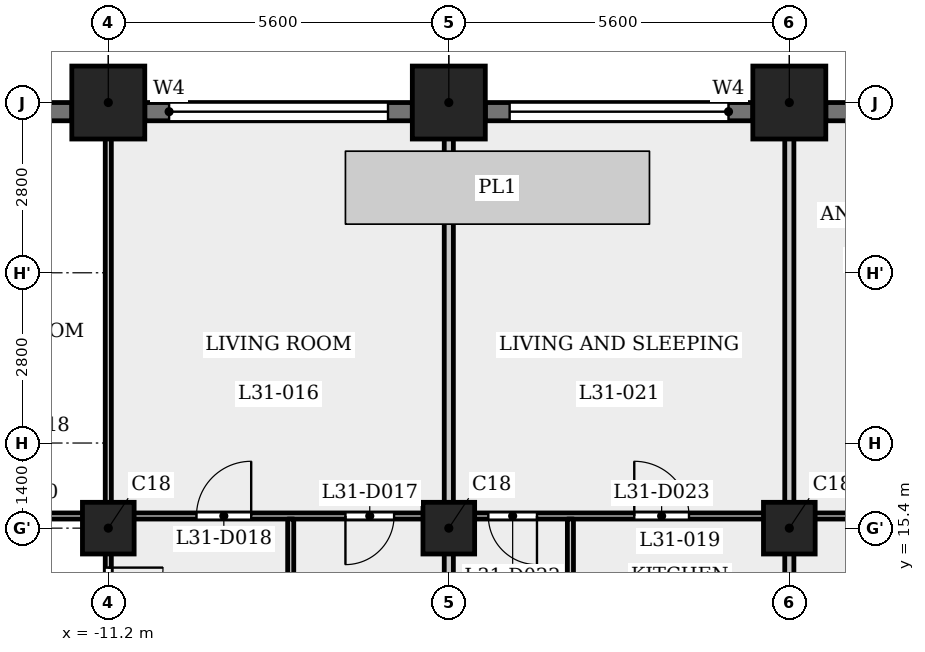
"""IFC4 building model, lengths in metres.
Left out: names, types, materials, properties, quantities, classifications, styles, units other than length and angle.
Written with IfcOpenShell. Run it as: python <this file> out.ifc"""

import sys

from ifc_helpers import new_model, si_unit, direction, frame, frame_2d, origin, origin_2d, place, context, subcontext, project, spatial, rectangle, extrude, element, fill, save


model = new_model("IFC4")
c1 = context("Model", 3, precision=1e-05, world=origin(), true_north=direction((0.0, 1.0)))
c2 = subcontext(c1, "Body", "Model", "MODEL_VIEW")
j1 = project(units=[si_unit("LENGTHUNIT", "METRE"), si_unit("PLANEANGLEUNIT", "RADIAN")], contexts=[c1])
p1 = place(None, origin())
s1 = spatial("IfcSite", under=j1, at=p1, CompositionType="ELEMENT")
p2 = place(p1, origin())
s2 = spatial("IfcBuilding", under=s1, at=p2, CompositionType="ELEMENT")
p3 = place(p2, frame((0.0, 0.0, 121.8)))
s3 = spatial("IfcBuildingStorey", under=s2, at=p3, CompositionType="ELEMENT", Elevation=121.8)
for number, where, z_axis, x_axis in (
    (1, (0.0, 22.4, 0.0), (0.0, 0.0, 1.0), (1.0, 0.0, 0.0)),
    (2, (-5.6, 22.4, 0.0), (0.0, 0.0, 1.0), (1.0, 0.0, 0.0)),
    (3, (-11.2, 22.4, 0.0), (0.0, 0.0, 1.0), (1.0, 0.0, 0.0)),
):
    element("IfcColumn", number, at=place(p3, frame(where, z_axis=z_axis, x_axis=x_axis)), inside=s3, PredefinedType="COLUMN", context=c2, shape_type="SweptSolid", body=[
        extrude(rectangle(XDim=1.2, YDim=1.2, at=origin_2d()), origin(), (0.0, 0.0, 1.0), 3.5),
    ])
for number, where, z_axis, x_axis in (
    (4, (-11.2, 15.4, 0.0), (0.0, 0.0, 1.0), (1.0, 0.0, 0.0)),
    (5, (-5.6, 15.4, 0.0), (0.0, 0.0, 1.0), (1.0, 0.0, 0.0)),
    (6, (0.0, 15.4, 0.0), (0.0, 0.0, 1.0), (1.0, 0.0, 0.0)),
):
    element("IfcColumn", number, at=place(p3, frame(where, z_axis=z_axis, x_axis=x_axis)), inside=s3, PredefinedType="COLUMN", context=c2, shape_type="SweptSolid", body=[
        extrude(rectangle(XDim=0.85, YDim=0.85, at=origin_2d()), origin(), (0.0, 0.0, 1.0), 3.5),
    ])
p4 = place(p3, frame((5.0, 22.25, 0.0), z_axis=(0.0, 0.0, 1.0), x_axis=(-1.0, 0.0, 0.0)))
e7 = element("IfcWall", 7, at=p4, inside=s3, PredefinedType="SOLIDWALL", context=c2, shape_type="SweptSolid", body=[
    extrude(rectangle(XDim=4.4, YDim=0.3, at=frame_2d((2.2, 0.0))), origin(), (0.0, 0.0, 1.0), 2.35),
])
p5 = place(p4, frame((0.262, 0.0, 0.6)))
e8 = element("IfcOpeningElement", 8, at=p5, cuts=e7, PredefinedType="OPENING", context=c2, shape_type="SweptSolid", body=[
    extrude(rectangle(XDim=1.2, YDim=1.55, at=frame_2d((0.6, 0.775))), frame((0.0, 0.16, 0.0), z_axis=(0.0, -1.0, 0.0), x_axis=(1.0, 0.0, 0.0)), (0.0, 0.0, 1.0), 0.32),
])
p6 = place(p4, frame((2.238, 0.0, 0.9)))
e9 = element("IfcOpeningElement", 9, at=p6, cuts=e7, PredefinedType="OPENING", context=c2, shape_type="SweptSolid", body=[
    extrude(rectangle(XDim=1.8, YDim=1.25, at=frame_2d((0.9, 0.625))), frame((0.0, 0.16, 0.0), z_axis=(0.0, -1.0, 0.0), x_axis=(1.0, 0.0, 0.0)), (0.0, 0.0, 1.0), 0.32),
])
p7 = place(p3, frame((-0.6, 22.25, 0.0), z_axis=(0.0, 0.0, 1.0), x_axis=(-1.0, 0.0, 0.0)))
e10 = element("IfcWall", 10, at=p7, inside=s3, PredefinedType="SOLIDWALL", context=c2, shape_type="SweptSolid", body=[
    extrude(rectangle(XDim=4.4, YDim=0.3, at=frame_2d((2.2, 0.0))), origin(), (0.0, 0.0, 1.0), 2.35),
])
p8 = place(p7, frame((0.4, 0.0, 1.2)))
e11 = element("IfcOpeningElement", 11, at=p8, cuts=e10, PredefinedType="OPENING", context=c2, shape_type="SweptSolid", body=[
    extrude(rectangle(XDim=3.6, YDim=0.95, at=frame_2d((1.8, 0.475))), frame((0.0, 0.16, 0.0), z_axis=(0.0, -1.0, 0.0), x_axis=(1.0, 0.0, 0.0)), (0.0, 0.0, 1.0), 0.32),
])
p9 = place(p3, frame((-6.2, 22.25, 0.0), z_axis=(0.0, 0.0, 1.0), x_axis=(-1.0, 0.0, 0.0)))
e12 = element("IfcWall", 12, at=p9, inside=s3, PredefinedType="SOLIDWALL", context=c2, shape_type="SweptSolid", body=[
    extrude(rectangle(XDim=4.4, YDim=0.3, at=frame_2d((2.2, 0.0))), origin(), (0.0, 0.0, 1.0), 2.35),
])
p10 = place(p9, frame((0.4, 0.0, 1.2)))
e13 = element("IfcOpeningElement", 13, at=p10, cuts=e12, PredefinedType="OPENING", context=c2, shape_type="SweptSolid", body=[
    extrude(rectangle(XDim=3.6, YDim=0.95, at=frame_2d((1.8, 0.475))), frame((0.0, 0.16, 0.0), z_axis=(0.0, -1.0, 0.0), x_axis=(1.0, 0.0, 0.0)), (0.0, 0.0, 1.0), 0.32),
])
p11 = place(p3, frame((-11.8, 22.25, 0.0), z_axis=(0.0, 0.0, 1.0), x_axis=(-1.0, 0.0, 0.0)))
e14 = element("IfcWall", 14, at=p11, inside=s3, PredefinedType="SOLIDWALL", context=c2, shape_type="SweptSolid", body=[
    extrude(rectangle(XDim=4.4, YDim=0.3, at=frame_2d((2.2, 0.0))), origin(), (0.0, 0.0, 1.0), 2.35),
])
p12 = place(p11, frame((0.363, 0.0, 0.6)))
e15 = element("IfcOpeningElement", 15, at=p12, cuts=e14, PredefinedType="OPENING", context=c2, shape_type="SweptSolid", body=[
    extrude(rectangle(XDim=1.2, YDim=1.55, at=frame_2d((0.6, 0.775))), frame((0.0, 0.16, 0.0), z_axis=(0.0, -1.0, 0.0), x_axis=(1.0, 0.0, 0.0)), (0.0, 0.0, 1.0), 0.32),
])
p13 = place(p11, frame((2.337, 0.0, 0.9)))
e16 = element("IfcOpeningElement", 16, at=p13, cuts=e14, PredefinedType="OPENING", context=c2, shape_type="SweptSolid", body=[
    extrude(rectangle(XDim=1.8, YDim=1.25, at=frame_2d((0.9, 0.625))), frame((0.0, 0.16, 0.0), z_axis=(0.0, -1.0, 0.0), x_axis=(1.0, 0.0, 0.0)), (0.0, 0.0, 1.0), 0.32),
])
p14 = place(p3, frame((-16.725, 15.6, 0.0), z_axis=(0.0, 0.0, 1.0), x_axis=(1.0, 0.0, 0.0)))
e17 = element("IfcWall", 17, at=p14, inside=s3, PredefinedType="PARTITIONING", context=c2, shape_type="SweptSolid", body=[
    extrude(rectangle(XDim=33.45, YDim=0.1, at=frame_2d((16.725, 0.0))), origin(), (0.0, 0.0, 1.0), 3.15),
])
p15 = place(p14, frame((9.425, 0.0, 0.0)))
e18 = element("IfcOpeningElement", 18, at=p15, cuts=e17, PredefinedType="OPENING", context=c2, shape_type="SweptSolid", body=[
    extrude(rectangle(XDim=0.8, YDim=2.1, at=frame_2d((0.4, 1.05))), frame((0.0, 0.06, 0.0), z_axis=(0.0, -1.0, 0.0), x_axis=(1.0, 0.0, 0.0)), (0.0, 0.0, 1.0), 0.12),
])
p16 = place(p14, frame((6.975, 0.0, 0.0)))
e19 = element("IfcOpeningElement", 19, at=p16, cuts=e17, PredefinedType="OPENING", context=c2, shape_type="SweptSolid", body=[
    extrude(rectangle(XDim=0.9, YDim=2.1, at=frame_2d((0.45, 1.05))), frame((0.0, 0.06, 0.0), z_axis=(0.0, -1.0, 0.0), x_axis=(1.0, 0.0, 0.0)), (0.0, 0.0, 1.0), 0.12),
])
p17 = place(p14, frame((1.875, 0.0, 0.0)))
e20 = element("IfcOpeningElement", 20, at=p17, cuts=e17, PredefinedType="OPENING", context=c2, shape_type="SweptSolid", body=[
    extrude(rectangle(XDim=0.9, YDim=2.1, at=frame_2d((0.45, 1.05))), frame((0.0, 0.06, 0.0), z_axis=(0.0, -1.0, 0.0), x_axis=(1.0, 0.0, 0.0)), (0.0, 0.0, 1.0), 0.12),
])
p18 = place(p14, frame((3.475, 0.0, 0.0)))
e21 = element("IfcOpeningElement", 21, at=p18, cuts=e17, PredefinedType="OPENING", context=c2, shape_type="SweptSolid", body=[
    extrude(rectangle(XDim=0.9, YDim=2.1, at=frame_2d((0.45, 1.05))), frame((0.0, 0.06, 0.0), z_axis=(0.0, -1.0, 0.0), x_axis=(1.0, 0.0, 0.0)), (0.0, 0.0, 1.0), 0.12),
])
p19 = place(p14, frame((11.775, 0.0, 0.0)))
e22 = element("IfcOpeningElement", 22, at=p19, cuts=e17, PredefinedType="OPENING", context=c2, shape_type="SweptSolid", body=[
    extrude(rectangle(XDim=0.8, YDim=2.1, at=frame_2d((0.4, 1.05))), frame((0.0, 0.06, 0.0), z_axis=(0.0, -1.0, 0.0), x_axis=(1.0, 0.0, 0.0)), (0.0, 0.0, 1.0), 0.12),
])
p20 = place(p14, frame((14.175, 0.0, 0.0)))
e23 = element("IfcOpeningElement", 23, at=p20, cuts=e17, PredefinedType="OPENING", context=c2, shape_type="SweptSolid", body=[
    extrude(rectangle(XDim=0.9, YDim=2.1, at=frame_2d((0.45, 1.05))), frame((0.0, 0.06, 0.0), z_axis=(0.0, -1.0, 0.0), x_axis=(1.0, 0.0, 0.0)), (0.0, 0.0, 1.0), 0.12),
])
p21 = place(p14, frame((20.725, 0.0, 0.0)))
e24 = element("IfcOpeningElement", 24, at=p21, cuts=e17, PredefinedType="OPENING", context=c2, shape_type="SweptSolid", body=[
    extrude(rectangle(XDim=0.8, YDim=2.1, at=frame_2d((0.4, 1.05))), frame((0.0, 0.06, 0.0), z_axis=(0.0, -1.0, 0.0), x_axis=(1.0, 0.0, 0.0)), (0.0, 0.0, 1.0), 0.12),
])
p22 = place(p14, frame((18.375, 0.0, 0.0)))
e25 = element("IfcOpeningElement", 25, at=p22, cuts=e17, PredefinedType="OPENING", context=c2, shape_type="SweptSolid", body=[
    extrude(rectangle(XDim=0.9, YDim=2.1, at=frame_2d((0.45, 1.05))), frame((0.0, 0.06, 0.0), z_axis=(0.0, -1.0, 0.0), x_axis=(1.0, 0.0, 0.0)), (0.0, 0.0, 1.0), 0.12),
])
p23 = place(p14, frame((26.425, 0.0, 0.0)))
e26 = element("IfcOpeningElement", 26, at=p23, cuts=e17, PredefinedType="OPENING", context=c2, shape_type="SweptSolid", body=[
    extrude(rectangle(XDim=0.8, YDim=2.1, at=frame_2d((0.4, 1.05))), frame((0.0, 0.06, 0.0), z_axis=(0.0, -1.0, 0.0), x_axis=(1.0, 0.0, 0.0)), (0.0, 0.0, 1.0), 0.12),
])
p24 = place(p14, frame((23.875, 0.0, 0.0)))
e27 = element("IfcOpeningElement", 27, at=p24, cuts=e17, PredefinedType="OPENING", context=c2, shape_type="SweptSolid", body=[
    extrude(rectangle(XDim=0.9, YDim=2.1, at=frame_2d((0.45, 1.05))), frame((0.0, 0.06, 0.0), z_axis=(0.0, -1.0, 0.0), x_axis=(1.0, 0.0, 0.0)), (0.0, 0.0, 1.0), 0.12),
])
p25 = place(p14, frame((28.575, 0.0, 0.0)))
e28 = element("IfcOpeningElement", 28, at=p25, cuts=e17, PredefinedType="OPENING", context=c2, shape_type="SweptSolid", body=[
    extrude(rectangle(XDim=0.8, YDim=2.1, at=frame_2d((0.4, 1.05))), frame((0.0, 0.06, 0.0), z_axis=(0.0, -1.0, 0.0), x_axis=(1.0, 0.0, 0.0)), (0.0, 0.0, 1.0), 0.12),
])
p26 = place(p14, frame((30.725, 0.0, 0.0)))
e29 = element("IfcOpeningElement", 29, at=p26, cuts=e17, PredefinedType="OPENING", context=c2, shape_type="SweptSolid", body=[
    extrude(rectangle(XDim=0.9, YDim=2.1, at=frame_2d((0.45, 1.05))), frame((0.0, 0.06, 0.0), z_axis=(0.0, -1.0, 0.0), x_axis=(1.0, 0.0, 0.0)), (0.0, 0.0, 1.0), 0.12),
])
p27 = place(p3, frame((-11.2, 13.275, 0.0), z_axis=(0.0, 0.0, 1.0), x_axis=(0.0, 1.0, 0.0)))
e30 = element("IfcWall", 30, at=p27, inside=s3, PredefinedType="PARTITIONING", context=c2, shape_type="SweptSolid", body=[
    extrude(rectangle(XDim=2.275, YDim=0.1, at=frame_2d((1.138, 0.0))), origin(), (0.0, 0.0, 1.0), 3.15),
])
p28 = place(p27, frame((0.576, 0.0, 0.0)))
e31 = element("IfcOpeningElement", 31, at=p28, cuts=e30, PredefinedType="OPENING", context=c2, shape_type="SweptSolid", body=[
    extrude(rectangle(XDim=0.9, YDim=2.1, at=frame_2d((0.45, 1.05))), frame((0.0, 0.06, 0.0), z_axis=(0.0, -1.0, 0.0), x_axis=(1.0, 0.0, 0.0)), (0.0, 0.0, 1.0), 0.12),
])
p29 = place(p3, frame((-11.2, 15.65, 0.0), z_axis=(0.0, 0.0, 1.0), x_axis=(0.0, 1.0, 0.0)))
e32 = element("IfcWall", 32, at=p29, inside=s3, PredefinedType="PARTITIONING", context=c2, shape_type="SweptSolid", body=[
    extrude(rectangle(XDim=7.33, YDim=0.1, at=frame_2d((3.665, 0.0))), origin(), (0.0, 0.0, 1.0), 3.15),
])
p30 = place(p3, frame((-8.2, 13.275, 0.0), z_axis=(0.0, 0.0, 1.0), x_axis=(0.0, 1.0, 0.0)))
e33 = element("IfcWall", 33, at=p30, inside=s3, PredefinedType="PARTITIONING", context=c2, shape_type="SweptSolid", body=[
    extrude(rectangle(XDim=2.275, YDim=0.1, at=frame_2d((1.138, 0.0))), origin(), (0.0, 0.0, 1.0), 3.15),
])
p31 = place(p3, frame((-5.6, 13.275, 0.0), z_axis=(0.0, 0.0, 1.0), x_axis=(0.0, 1.0, 0.0)))
e34 = element("IfcWall", 34, at=p31, inside=s3, PredefinedType="PARTITIONING", context=c2, shape_type="SweptSolid", body=[
    extrude(rectangle(XDim=2.275, YDim=0.15, at=frame_2d((1.138, 0.0))), origin(), (0.0, 0.0, 1.0), 3.15),
])
p32 = place(p3, frame((-5.6, 15.65, 0.0), z_axis=(0.0, 0.0, 1.0), x_axis=(0.0, 1.0, 0.0)))
e35 = element("IfcWall", 35, at=p32, inside=s3, PredefinedType="PARTITIONING", context=c2, shape_type="SweptSolid", body=[
    extrude(rectangle(XDim=7.33, YDim=0.15, at=frame_2d((3.665, 0.0))), origin(), (0.0, 0.0, 1.0), 3.15),
])
p33 = place(p3, frame((-3.6, 13.275, 0.0), z_axis=(0.0, 0.0, 1.0), x_axis=(0.0, 1.0, 0.0)))
e36 = element("IfcWall", 36, at=p33, inside=s3, PredefinedType="PARTITIONING", context=c2, shape_type="SweptSolid", body=[
    extrude(rectangle(XDim=2.275, YDim=0.1, at=frame_2d((1.138, 0.0))), origin(), (0.0, 0.0, 1.0), 3.15),
])
p34 = place(p3, frame((0.0, 13.275, 0.0), z_axis=(0.0, 0.0, 1.0), x_axis=(0.0, 1.0, 0.0)))
e37 = element("IfcWall", 37, at=p34, inside=s3, PredefinedType="PARTITIONING", context=c2, shape_type="SweptSolid", body=[
    extrude(rectangle(XDim=2.275, YDim=0.15, at=frame_2d((1.138, 0.0))), origin(), (0.0, 0.0, 1.0), 3.15),
])
p35 = place(p3, frame((0.0, 15.65, 0.0), z_axis=(0.0, 0.0, 1.0), x_axis=(0.0, 1.0, 0.0)))
e38 = element("IfcWall", 38, at=p35, inside=s3, PredefinedType="PARTITIONING", context=c2, shape_type="SweptSolid", body=[
    extrude(rectangle(XDim=7.33, YDim=0.15, at=frame_2d((3.665, 0.0))), origin(), (0.0, 0.0, 1.0), 3.15),
])
p36 = place(p28, origin())
e39 = element("IfcDoor", 39, at=p36, inside=s3, OperationType="SINGLE_SWING_RIGHT", PredefinedType="DOOR", context=c2, shape_type="SweptSolid", body=[
    extrude(rectangle(XDim=0.9, YDim=2.1, at=frame_2d((0.45, 1.05))), frame((0.0, 0.025, 0.0), z_axis=(0.0, -1.0, 0.0), x_axis=(1.0, 0.0, 0.0)), (0.0, 0.0, 1.0), 0.05),
])
fill(e31, e39)
p37 = place(p15, origin())
e40 = element("IfcDoor", 40, at=p37, inside=s3, OperationType="SINGLE_SWING_LEFT", PredefinedType="DOOR", context=c2, shape_type="SweptSolid", body=[
    extrude(rectangle(XDim=0.8, YDim=2.1, at=frame_2d((0.4, 1.05))), frame((0.0, 0.025, 0.0), z_axis=(0.0, -1.0, 0.0), x_axis=(1.0, 0.0, 0.0)), (0.0, 0.0, 1.0), 0.05),
])
fill(e18, e40)
p38 = place(p16, origin())
e41 = element("IfcDoor", 41, at=p38, inside=s3, OperationType="SINGLE_SWING_LEFT", PredefinedType="DOOR", context=c2, shape_type="SweptSolid", body=[
    extrude(rectangle(XDim=0.9, YDim=2.1, at=frame_2d((0.45, 1.05))), frame((0.0, 0.025, 0.0), z_axis=(0.0, -1.0, 0.0), x_axis=(1.0, 0.0, 0.0)), (0.0, 0.0, 1.0), 0.05),
])
fill(e19, e41)
p39 = place(p19, origin())
e42 = element("IfcDoor", 42, at=p39, inside=s3, OperationType="SINGLE_SWING_RIGHT", PredefinedType="DOOR", context=c2, shape_type="SweptSolid", body=[
    extrude(rectangle(XDim=0.8, YDim=2.1, at=frame_2d((0.4, 1.05))), frame((0.0, 0.025, 0.0), z_axis=(0.0, -1.0, 0.0), x_axis=(1.0, 0.0, 0.0)), (0.0, 0.0, 1.0), 0.05),
])
fill(e22, e42)
p40 = place(p20, origin())
e43 = element("IfcDoor", 43, at=p40, inside=s3, OperationType="SINGLE_SWING_RIGHT", PredefinedType="DOOR", context=c2, shape_type="SweptSolid", body=[
    extrude(rectangle(XDim=0.9, YDim=2.1, at=frame_2d((0.45, 1.05))), frame((0.0, 0.025, 0.0), z_axis=(0.0, -1.0, 0.0), x_axis=(1.0, 0.0, 0.0)), (0.0, 0.0, 1.0), 0.05),
])
fill(e23, e43)
p41 = place(p8, origin())
e44 = element("IfcWindow", 44, at=p41, inside=s3, PartitioningType="SINGLE_PANEL", PredefinedType="WINDOW", context=c2, shape_type="SweptSolid", body=[
    extrude(rectangle(XDim=3.6, YDim=0.95, at=frame_2d((1.8, 0.475))), frame((0.0, 0.03, 0.0), z_axis=(0.0, -1.0, 0.0), x_axis=(1.0, 0.0, 0.0)), (0.0, 0.0, 1.0), 0.06),
])
fill(e11, e44)
p42 = place(p10, origin())
e45 = element("IfcWindow", 45, at=p42, inside=s3, PartitioningType="SINGLE_PANEL", PredefinedType="WINDOW", context=c2, shape_type="SweptSolid", body=[
    extrude(rectangle(XDim=3.6, YDim=0.95, at=frame_2d((1.8, 0.475))), frame((0.0, 0.03, 0.0), z_axis=(0.0, -1.0, 0.0), x_axis=(1.0, 0.0, 0.0)), (0.0, 0.0, 1.0), 0.06),
])
fill(e13, e45)
save(model, sys.argv[1])
